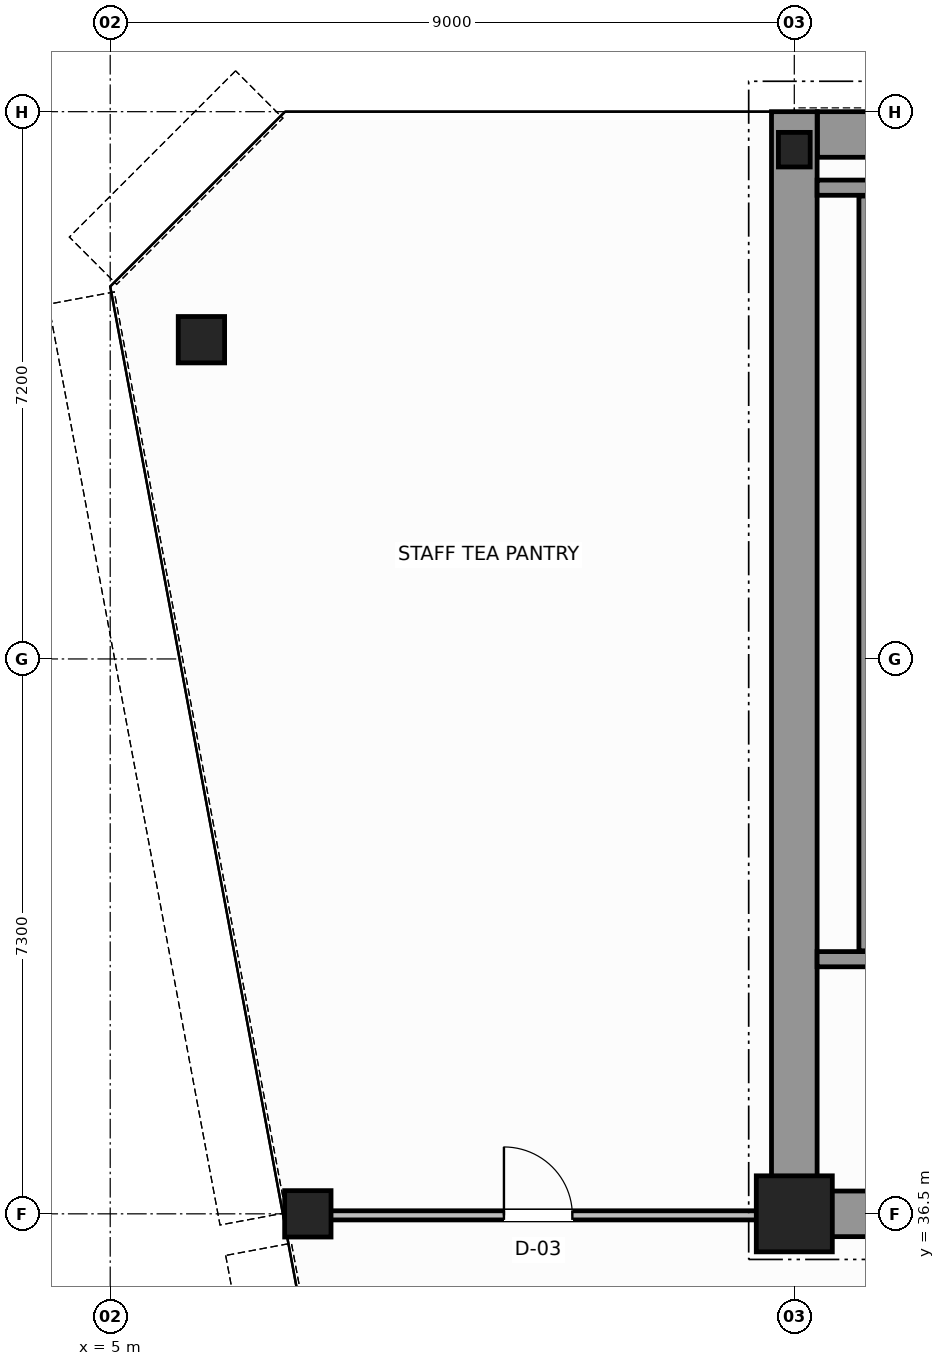
"""IFC4 building model, lengths in metres.
Left out: names, types, materials, properties, quantities, classifications, styles, units other than length and angle.
Written with IfcOpenShell. Run it as: python <this file> out.ifc"""

import sys

from ifc_helpers import new_model, si_unit, direction, frame, frame_2d, origin, origin_2d, place, context, subcontext, project, spatial, rectangle, hollow_circle, i_section, extrude, source, transform, mapped, element, fill, save


model = new_model("IFC4")
c1 = context("Model", 3, precision=1e-05, world=origin(), true_north=direction((0.0, 1.0)))
c2 = subcontext(c1, "Body", "Model", "MODEL_VIEW")
j1 = project(units=[si_unit("LENGTHUNIT", "METRE"), si_unit("PLANEANGLEUNIT", "RADIAN")], contexts=[c1])
p1 = place(None, origin())
s1 = spatial("IfcSite", under=j1, at=p1, CompositionType="ELEMENT")
p2 = place(p1, origin())
s2 = spatial("IfcBuilding", under=s1, at=p2, CompositionType="ELEMENT")
p3 = place(p2, frame((0.0, 0.0, 238.4)))
s3 = spatial("IfcBuildingStorey", under=s2, at=p3, CompositionType="ELEMENT", Elevation=238.4)
m1 = source(origin(), c2, "Body", "SweptSolid", [
    extrude(rectangle(XDim=1.0, YDim=1.0, at=origin_2d()), origin(), (0.0, 0.0, 1.0), 3.8),
])
p4 = place(p3, frame((14.0, 36.5, 0.0), z_axis=(0.0, 0.0, 1.0), x_axis=(1.0, 0.0, 0.0)))
e1 = element("IfcColumn", 1, at=p4, inside=s3, PredefinedType="COLUMN", context=c2, shape_type="MappedRepresentation", body=[
    mapped(m1, transform((0.0, 0.0, 0.0), scale=1.0)),
])
m2 = source(origin(), c2, "Body", "SweptSolid", [
    extrude(i_section(OverallWidth=0.418, OverallDepth=0.455, WebThickness=0.042, FlangeThickness=0.058, FilletRadius=0.015, at=origin_2d()), origin(), (0.0, 0.0, 1.0), 3.8),
])
p5 = place(p3, frame((14.0, 50.5, 0.0), z_axis=(0.0, 0.0, 1.0), x_axis=(1.0, 0.0, 0.0)))
e2 = element("IfcColumn", 2, at=p5, inside=s3, PredefinedType="COLUMN", context=c2, shape_type="MappedRepresentation", body=[
    mapped(m2, transform((0.0, 0.0, 0.0), scale=1.0)),
])
m3 = source(origin(), c2, "Body", "SweptSolid", [
    extrude(hollow_circle(Radius=0.305, WallThickness=0.03, at=origin_2d()), origin(), (0.0, 0.0, 1.0), 3.8),
])
for number, where, z_axis, x_axis in (
    (3, (6.2, 48.0, 0.0), (0.0, 0.0, 1.0), (1.0, 0.0, 0.0)),
    (4, (7.6, 36.5, 0.0), (0.0, 0.0, 1.0), (1.0, 0.0, 0.0)),
):
    element("IfcColumn", number, at=place(p3, frame(where, z_axis=z_axis, x_axis=x_axis)), inside=s3, PredefinedType="COLUMN", context=c2, shape_type="MappedRepresentation", body=[
        mapped(m3, transform((0.0, 0.0, 0.0), scale=1.0)),
    ])
p6 = place(p3, frame((14.304, 50.7, 0.0), z_axis=(0.0, 0.0, 1.0), x_axis=(1.0, 0.0, 0.0)))
e5 = element("IfcWall", 5, at=p6, inside=s3, PredefinedType="SHEAR", context=c2, shape_type="SweptSolid", body=[
    extrude(rectangle(XDim=19.694, YDim=0.6, at=frame_2d((9.847, 0.0))), origin(), (0.0, 0.0, 1.0), 3.8),
])
p7 = place(p3, frame((14.0, 36.5, 0.0), z_axis=(0.0, 0.0, 1.0), x_axis=(0.0, 1.0, 0.0)))
e6 = element("IfcWall", 6, at=p7, inside=s3, PredefinedType="SHEAR", context=c2, shape_type="SweptSolid", body=[
    extrude(rectangle(XDim=14.5, YDim=0.6, at=frame_2d((7.25, 0.0))), origin(), (0.0, 0.0, 1.0), 3.8),
])
p8 = place(p3, frame((14.32, 36.5, 0.0), z_axis=(0.0, 0.0, 1.0), x_axis=(1.0, 0.0, 0.0)))
e7 = element("IfcWall", 7, at=p8, inside=s3, PredefinedType="SHEAR", context=c2, shape_type="SweptSolid", body=[
    extrude(rectangle(XDim=3.88, YDim=0.6, at=frame_2d((1.94, 0.0))), origin(), (0.0, 0.0, 1.0), 2.58),
])
p9 = place(p3, frame((14.3, 39.85, 0.0), z_axis=(0.0, 0.0, 1.0), x_axis=(1.0, 0.0, 0.0)))
e8 = element("IfcWall", 8, at=p9, inside=s3, PredefinedType="SOLIDWALL", context=c2, shape_type="SweptSolid", body=[
    extrude(rectangle(XDim=4.3, YDim=0.2, at=frame_2d((2.15, 0.0))), origin(), (0.0, 0.0, 1.0), 3.8),
])
p10 = place(p9, frame((1.875, 0.0, 0.0)))
e9 = element("IfcOpeningElement", 9, at=p10, cuts=e8, PredefinedType="OPENING", context=c2, shape_type="SweptSolid", body=[
    extrude(rectangle(XDim=1.1, YDim=2.15, at=frame_2d((0.55, 1.075))), frame((0.0, 0.11, 0.0), z_axis=(0.0, -1.0, 0.0), x_axis=(1.0, 0.0, 0.0)), (0.0, 0.0, 1.0), 0.22),
])
p11 = place(p3, frame((14.3, 50.0, 0.0), z_axis=(0.0, 0.0, 1.0), x_axis=(1.0, 0.0, 0.0)))
e10 = element("IfcWall", 10, at=p11, inside=s3, PredefinedType="SOLIDWALL", context=c2, shape_type="SweptSolid", body=[
    extrude(rectangle(XDim=4.3, YDim=0.2, at=frame_2d((2.15, 0.0))), origin(), (0.0, 0.0, 1.0), 3.8),
])
p12 = place(p3, frame((14.95, 39.96, 0.0), z_axis=(0.0, 0.0, 1.0), x_axis=(0.0, 1.0, 0.0)))
e11 = element("IfcWall", 11, at=p12, inside=s3, PredefinedType="SOLIDWALL", context=c2, shape_type="SweptSolid", body=[
    extrude(rectangle(XDim=9.93, YDim=0.2, at=frame_2d((4.965, 0.0))), origin(), (0.0, 0.0, 1.0), 3.8),
])
p13 = place(p3, frame((7.321, 36.48, 0.0), z_axis=(0.0, 0.0, 1.0), x_axis=(1.0, 0.0, 0.0)))
e12 = element("IfcWall", 12, at=p13, inside=s3, PredefinedType="PARTITIONING", context=c2, shape_type="SweptSolid", body=[
    extrude(rectangle(XDim=6.619, YDim=0.12, at=frame_2d((3.31, 0.0))), origin(), (0.0, 0.0, 1.0), 3.02),
])
p14 = place(p13, frame((2.859, 0.0, 0.0)))
e13 = element("IfcOpeningElement", 13, at=p14, cuts=e12, PredefinedType="OPENING", context=c2, shape_type="SweptSolid", body=[
    extrude(rectangle(XDim=0.9, YDim=2.15, at=frame_2d((0.45, 1.075))), frame((0.0, 0.07, 0.0), z_axis=(0.0, -1.0, 0.0), x_axis=(1.0, 0.0, 0.0)), (0.0, 0.0, 1.0), 0.14),
])
m4 = source(origin(), c2, "Body", "SweptSolid", [
    extrude(rectangle(XDim=0.9, YDim=2.15, at=frame_2d((0.45, 1.075))), frame((0.0, 0.025, 0.0), z_axis=(0.0, -1.0, 0.0), x_axis=(1.0, 0.0, 0.0)), (0.0, 0.0, 1.0), 0.05),
])
p15 = place(p14, origin())
e14 = element("IfcDoor", 14, at=p15, inside=s3, OperationType="SINGLE_SWING_LEFT", PredefinedType="DOOR", context=c2, shape_type="MappedRepresentation", body=[
    mapped(m4, transform((0.0, 0.0, 0.0), scale=1.0)),
])
fill(e13, e14)
save(model, sys.argv[1])
